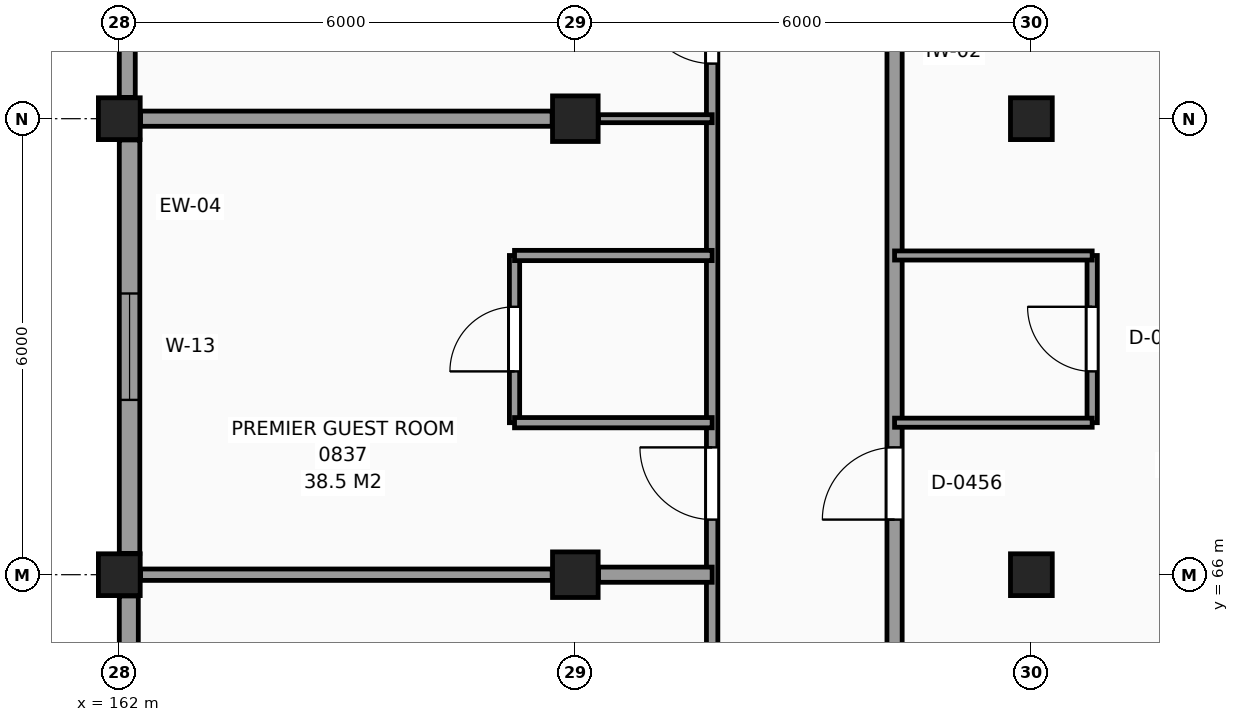
"""IFC4 building model, lengths in metres.
Left out: names, types, materials, properties, quantities, classifications, styles, units other than length and angle.
Written with IfcOpenShell. Run it as: python <this file> out.ifc"""

import sys

from ifc_helpers import new_model, si_unit, direction, frame, frame_2d, origin, origin_2d, place, context, subcontext, project, spatial, rectangle, extrude, element, fill, save


model = new_model("IFC4")
c1 = context("Model", 3, precision=1e-05, world=origin(), true_north=direction((0.0, 1.0)))
c2 = subcontext(c1, "Body", "Model", "MODEL_VIEW")
j1 = project(units=[si_unit("LENGTHUNIT", "METRE"), si_unit("PLANEANGLEUNIT", "RADIAN")], contexts=[c1])
p1 = place(None, origin())
s1 = spatial("IfcSite", under=j1, at=p1, CompositionType="ELEMENT")
p2 = place(p1, origin())
s2 = spatial("IfcBuilding", under=s1, at=p2, CompositionType="ELEMENT")
p3 = place(p2, frame((0.0, 0.0, 34.8)))
s3 = spatial("IfcBuildingStorey", under=s2, at=p3, CompositionType="ELEMENT", Elevation=34.8)
for number, where, z_axis, x_axis in (
    (1, (162.0, 66.0, 0.0), (0.0, 0.0, 1.0), (1.0, 0.0, 0.0)),
    (2, (162.0, 72.0, 0.0), (0.0, 0.0, 1.0), (1.0, 0.0, 0.0)),
):
    element("IfcColumn", number, at=place(p3, frame(where, z_axis=z_axis, x_axis=x_axis)), inside=s3, PredefinedType="COLUMN", context=c2, shape_type="SweptSolid", body=[
        extrude(rectangle(XDim=0.55, YDim=0.55, at=origin_2d()), origin(), (0.0, 0.0, 1.0), 3.3),
    ])
for number, where, z_axis, x_axis in (
    (3, (168.0, 66.0, 0.0), (0.0, 0.0, 1.0), (1.0, 0.0, 0.0)),
    (4, (168.0, 72.0, 0.0), (0.0, 0.0, 1.0), (1.0, 0.0, 0.0)),
):
    element("IfcColumn", number, at=place(p3, frame(where, z_axis=z_axis, x_axis=x_axis)), inside=s3, PredefinedType="COLUMN", context=c2, shape_type="SweptSolid", body=[
        extrude(rectangle(XDim=0.6, YDim=0.6, at=origin_2d()), origin(), (0.0, 0.0, 1.0), 3.3),
    ])
for number, where, z_axis, x_axis in (
    (5, (174.0, 66.0, 0.0), (0.0, 0.0, 1.0), (1.0, 0.0, 0.0)),
    (6, (174.0, 72.0, 0.0), (0.0, 0.0, 1.0), (1.0, 0.0, 0.0)),
):
    element("IfcColumn", number, at=place(p3, frame(where, z_axis=z_axis, x_axis=x_axis)), inside=s3, PredefinedType="COLUMN", context=c2, shape_type="SweptSolid", body=[
        extrude(rectangle(XDim=0.55, YDim=0.55, at=origin_2d()), origin(), (0.0, 0.0, 1.0), 3.3),
    ])
p4 = place(p3, frame((162.105, 77.72, 0.0), z_axis=(0.0, 0.0, 1.0), x_axis=(0.0, -1.0, 0.0)))
e7 = element("IfcWall", 7, at=p4, inside=s3, PredefinedType="SOLIDWALL", context=c2, shape_type="SweptSolid", body=[
    extrude(rectangle(XDim=5.44, YDim=0.21, at=frame_2d((2.72, 0.0))), origin(), (0.0, 0.0, 1.0), 2.42),
])
p5 = place(p4, frame((2.02, 0.0, 0.8)))
e8 = element("IfcOpeningElement", 8, at=p5, cuts=e7, PredefinedType="OPENING", context=c2, shape_type="SweptSolid", body=[
    extrude(rectangle(XDim=1.4, YDim=1.4, at=frame_2d((0.7, 0.7))), frame((0.0, 0.115, 0.0), z_axis=(0.0, -1.0, 0.0), x_axis=(1.0, 0.0, 0.0)), (0.0, 0.0, 1.0), 0.23),
])
p6 = place(p3, frame((162.135, 71.72, 0.0), z_axis=(0.0, 0.0, 1.0), x_axis=(0.0, -1.0, 0.0)))
e9 = element("IfcWall", 9, at=p6, inside=s3, PredefinedType="SOLIDWALL", context=c2, shape_type="SweptSolid", body=[
    extrude(rectangle(XDim=5.44, YDim=0.27, at=frame_2d((2.72, 0.0))), origin(), (0.0, 0.0, 1.0), 2.42),
])
p7 = place(p6, frame((2.02, 0.0, 0.8)))
e10 = element("IfcOpeningElement", 10, at=p7, cuts=e9, PredefinedType="OPENING", context=c2, shape_type="SweptSolid", body=[
    extrude(rectangle(XDim=1.4, YDim=1.4, at=frame_2d((0.7, 0.7))), frame((0.0, 0.145, 0.0), z_axis=(0.0, -1.0, 0.0), x_axis=(1.0, 0.0, 0.0)), (0.0, 0.0, 1.0), 0.29),
])
p8 = place(p3, frame((162.125, 65.72, 0.0), z_axis=(0.0, 0.0, 1.0), x_axis=(0.0, -1.0, 0.0)))
e11 = element("IfcWall", 11, at=p8, inside=s3, PredefinedType="SOLIDWALL", context=c2, shape_type="SweptSolid", body=[
    extrude(rectangle(XDim=5.44, YDim=0.25, at=frame_2d((2.72, 0.0))), origin(), (0.0, 0.0, 1.0), 2.42),
])
p9 = place(p8, frame((2.02, 0.0, 0.8)))
e12 = element("IfcOpeningElement", 12, at=p9, cuts=e11, PredefinedType="OPENING", context=c2, shape_type="SweptSolid", body=[
    extrude(rectangle(XDim=1.4, YDim=1.4, at=frame_2d((0.7, 0.7))), frame((0.0, 0.135, 0.0), z_axis=(0.0, -1.0, 0.0), x_axis=(1.0, 0.0, 0.0)), (0.0, 0.0, 1.0), 0.27),
])
p10 = place(p3, frame((167.2, 68.0, 0.0), z_axis=(0.0, 0.0, 1.0), x_axis=(0.0, 1.0, 0.0)))
e13 = element("IfcWall", 13, at=p10, inside=s3, PredefinedType="PARTITIONING", context=c2, shape_type="SweptSolid", body=[
    extrude(rectangle(XDim=2.2, YDim=0.135, at=frame_2d((1.1, 0.0))), origin(), (0.0, 0.0, 1.0), 3.07),
])
p11 = place(p10, frame((0.675, 0.0, 0.0)))
e14 = element("IfcOpeningElement", 14, at=p11, cuts=e13, PredefinedType="OPENING", context=c2, shape_type="SweptSolid", body=[
    extrude(rectangle(XDim=0.85, YDim=2.1, at=frame_2d((0.425, 1.05))), frame((0.0, 0.078, 0.0), z_axis=(0.0, -1.0, 0.0), x_axis=(1.0, 0.0, 0.0)), (0.0, 0.0, 1.0), 0.155),
])
p12 = place(p3, frame((169.8, 42.235, 0.0), z_axis=(0.0, 0.0, 1.0), x_axis=(0.0, 1.0, 0.0)))
e15 = element("IfcWall", 15, at=p12, inside=s3, PredefinedType="PARTITIONING", context=c2, shape_type="SweptSolid", body=[
    extrude(rectangle(XDim=65.585, YDim=0.15, at=frame_2d((32.792, 0.0))), origin(), (0.0, 0.0, 1.0), 3.07),
])
p13 = place(p12, frame((50.165, 0.0, 0.0)))
e16 = element("IfcOpeningElement", 16, at=p13, cuts=e15, PredefinedType="OPENING", context=c2, shape_type="SweptSolid", body=[
    extrude(rectangle(XDim=1.2, YDim=2.2, at=frame_2d((0.6, 1.1))), frame((0.0, 0.085, 0.0), z_axis=(0.0, -1.0, 0.0), x_axis=(1.0, 0.0, 0.0)), (0.0, 0.0, 1.0), 0.17),
])
p14 = place(p12, frame((0.44, 0.0, 0.0)))
e17 = element("IfcOpeningElement", 17, at=p14, cuts=e15, PredefinedType="OPENING", context=c2, shape_type="SweptSolid", body=[
    extrude(rectangle(XDim=0.95, YDim=2.1, at=frame_2d((0.475, 1.05))), frame((0.0, 0.085, 0.0), z_axis=(0.0, -1.0, 0.0), x_axis=(1.0, 0.0, 0.0)), (0.0, 0.0, 1.0), 0.17),
])
p15 = place(p12, frame((6.49, 0.0, 0.0)))
e18 = element("IfcOpeningElement", 18, at=p15, cuts=e15, PredefinedType="OPENING", context=c2, shape_type="SweptSolid", body=[
    extrude(rectangle(XDim=0.95, YDim=2.1, at=frame_2d((0.475, 1.05))), frame((0.0, 0.085, 0.0), z_axis=(0.0, -1.0, 0.0), x_axis=(1.0, 0.0, 0.0)), (0.0, 0.0, 1.0), 0.17),
])
p16 = place(p12, frame((12.49, 0.0, 0.0)))
e19 = element("IfcOpeningElement", 19, at=p16, cuts=e15, PredefinedType="OPENING", context=c2, shape_type="SweptSolid", body=[
    extrude(rectangle(XDim=0.95, YDim=2.1, at=frame_2d((0.475, 1.05))), frame((0.0, 0.085, 0.0), z_axis=(0.0, -1.0, 0.0), x_axis=(1.0, 0.0, 0.0)), (0.0, 0.0, 1.0), 0.17),
])
p17 = place(p12, frame((18.49, 0.0, 0.0)))
e20 = element("IfcOpeningElement", 20, at=p17, cuts=e15, PredefinedType="OPENING", context=c2, shape_type="SweptSolid", body=[
    extrude(rectangle(XDim=0.95, YDim=2.1, at=frame_2d((0.475, 1.05))), frame((0.0, 0.085, 0.0), z_axis=(0.0, -1.0, 0.0), x_axis=(1.0, 0.0, 0.0)), (0.0, 0.0, 1.0), 0.17),
])
p18 = place(p12, frame((24.49, 0.0, 0.0)))
e21 = element("IfcOpeningElement", 21, at=p18, cuts=e15, PredefinedType="OPENING", context=c2, shape_type="SweptSolid", body=[
    extrude(rectangle(XDim=0.95, YDim=2.1, at=frame_2d((0.475, 1.05))), frame((0.0, 0.085, 0.0), z_axis=(0.0, -1.0, 0.0), x_axis=(1.0, 0.0, 0.0)), (0.0, 0.0, 1.0), 0.17),
])
p19 = place(p12, frame((30.49, 0.0, 0.0)))
e22 = element("IfcOpeningElement", 22, at=p19, cuts=e15, PredefinedType="OPENING", context=c2, shape_type="SweptSolid", body=[
    extrude(rectangle(XDim=0.95, YDim=2.1, at=frame_2d((0.475, 1.05))), frame((0.0, 0.085, 0.0), z_axis=(0.0, -1.0, 0.0), x_axis=(1.0, 0.0, 0.0)), (0.0, 0.0, 1.0), 0.17),
])
p20 = place(p12, frame((54.49, 0.0, 0.0)))
e23 = element("IfcOpeningElement", 23, at=p20, cuts=e15, PredefinedType="OPENING", context=c2, shape_type="SweptSolid", body=[
    extrude(rectangle(XDim=0.95, YDim=2.1, at=frame_2d((0.475, 1.05))), frame((0.0, 0.085, 0.0), z_axis=(0.0, -1.0, 0.0), x_axis=(1.0, 0.0, 0.0)), (0.0, 0.0, 1.0), 0.17),
])
p21 = place(p12, frame((60.49, 0.0, 0.0)))
e24 = element("IfcOpeningElement", 24, at=p21, cuts=e15, PredefinedType="OPENING", context=c2, shape_type="SweptSolid", body=[
    extrude(rectangle(XDim=0.95, YDim=2.1, at=frame_2d((0.475, 1.05))), frame((0.0, 0.085, 0.0), z_axis=(0.0, -1.0, 0.0), x_axis=(1.0, 0.0, 0.0)), (0.0, 0.0, 1.0), 0.17),
])
p22 = place(p3, frame((172.2, 42.235, 0.0), z_axis=(0.0, 0.0, 1.0), x_axis=(0.0, 1.0, 0.0)))
e25 = element("IfcWall", 25, at=p22, inside=s3, PredefinedType="PARTITIONING", context=c2, shape_type="SweptSolid", body=[
    extrude(rectangle(XDim=65.585, YDim=0.2, at=frame_2d((32.792, 0.0))), origin(), (0.0, 0.0, 1.0), 3.07),
])
p23 = place(p22, frame((7.59, 0.0, 0.0)))
e26 = element("IfcOpeningElement", 26, at=p23, cuts=e25, PredefinedType="OPENING", context=c2, shape_type="SweptSolid", body=[
    extrude(rectangle(XDim=0.95, YDim=2.1, at=frame_2d((0.475, 1.05))), frame((0.0, 0.11, 0.0), z_axis=(0.0, -1.0, 0.0), x_axis=(1.0, 0.0, 0.0)), (0.0, 0.0, 1.0), 0.22),
])
p24 = place(p22, frame((12.09, 0.0, 0.0)))
e27 = element("IfcOpeningElement", 27, at=p24, cuts=e25, PredefinedType="OPENING", context=c2, shape_type="SweptSolid", body=[
    extrude(rectangle(XDim=0.95, YDim=2.1, at=frame_2d((0.475, 1.05))), frame((0.0, 0.11, 0.0), z_axis=(0.0, -1.0, 0.0), x_axis=(1.0, 0.0, 0.0)), (0.0, 0.0, 1.0), 0.22),
])
p25 = place(p22, frame((16.29, 0.0, 0.0)))
e28 = element("IfcOpeningElement", 28, at=p25, cuts=e25, PredefinedType="OPENING", context=c2, shape_type="SweptSolid", body=[
    extrude(rectangle(XDim=0.95, YDim=2.1, at=frame_2d((0.475, 1.05))), frame((0.0, 0.11, 0.0), z_axis=(0.0, -1.0, 0.0), x_axis=(1.0, 0.0, 0.0)), (0.0, 0.0, 1.0), 0.22),
])
p26 = place(p22, frame((18.49, 0.0, 0.0)))
e29 = element("IfcOpeningElement", 29, at=p26, cuts=e25, PredefinedType="OPENING", context=c2, shape_type="SweptSolid", body=[
    extrude(rectangle(XDim=0.95, YDim=2.1, at=frame_2d((0.475, 1.05))), frame((0.0, 0.11, 0.0), z_axis=(0.0, -1.0, 0.0), x_axis=(1.0, 0.0, 0.0)), (0.0, 0.0, 1.0), 0.22),
])
p27 = place(p22, frame((24.49, 0.0, 0.0)))
e30 = element("IfcOpeningElement", 30, at=p27, cuts=e25, PredefinedType="OPENING", context=c2, shape_type="SweptSolid", body=[
    extrude(rectangle(XDim=0.95, YDim=2.1, at=frame_2d((0.475, 1.05))), frame((0.0, 0.11, 0.0), z_axis=(0.0, -1.0, 0.0), x_axis=(1.0, 0.0, 0.0)), (0.0, 0.0, 1.0), 0.22),
])
p28 = place(p22, frame((34.29, 0.0, 0.0)))
e31 = element("IfcOpeningElement", 31, at=p28, cuts=e25, PredefinedType="OPENING", context=c2, shape_type="SweptSolid", body=[
    extrude(rectangle(XDim=0.95, YDim=2.1, at=frame_2d((0.475, 1.05))), frame((0.0, 0.11, 0.0), z_axis=(0.0, -1.0, 0.0), x_axis=(1.0, 0.0, 0.0)), (0.0, 0.0, 1.0), 0.22),
])
p29 = place(p22, frame((36.49, 0.0, 0.0)))
e32 = element("IfcOpeningElement", 32, at=p29, cuts=e25, PredefinedType="OPENING", context=c2, shape_type="SweptSolid", body=[
    extrude(rectangle(XDim=0.95, YDim=2.1, at=frame_2d((0.475, 1.05))), frame((0.0, 0.11, 0.0), z_axis=(0.0, -1.0, 0.0), x_axis=(1.0, 0.0, 0.0)), (0.0, 0.0, 1.0), 0.22),
])
p30 = place(p22, frame((40.89, 0.0, 0.0)))
e33 = element("IfcOpeningElement", 33, at=p30, cuts=e25, PredefinedType="OPENING", context=c2, shape_type="SweptSolid", body=[
    extrude(rectangle(XDim=0.95, YDim=2.1, at=frame_2d((0.475, 1.05))), frame((0.0, 0.11, 0.0), z_axis=(0.0, -1.0, 0.0), x_axis=(1.0, 0.0, 0.0)), (0.0, 0.0, 1.0), 0.22),
])
p31 = place(p22, frame((45.39, 0.0, 0.0)))
e34 = element("IfcOpeningElement", 34, at=p31, cuts=e25, PredefinedType="OPENING", context=c2, shape_type="SweptSolid", body=[
    extrude(rectangle(XDim=0.95, YDim=2.1, at=frame_2d((0.475, 1.05))), frame((0.0, 0.11, 0.0), z_axis=(0.0, -1.0, 0.0), x_axis=(1.0, 0.0, 0.0)), (0.0, 0.0, 1.0), 0.22),
])
p32 = place(p22, frame((54.49, 0.0, 0.0)))
e35 = element("IfcOpeningElement", 35, at=p32, cuts=e25, PredefinedType="OPENING", context=c2, shape_type="SweptSolid", body=[
    extrude(rectangle(XDim=0.95, YDim=2.1, at=frame_2d((0.475, 1.05))), frame((0.0, 0.11, 0.0), z_axis=(0.0, -1.0, 0.0), x_axis=(1.0, 0.0, 0.0)), (0.0, 0.0, 1.0), 0.22),
])
p33 = place(p22, frame((60.49, 0.0, 0.0)))
e36 = element("IfcOpeningElement", 36, at=p33, cuts=e25, PredefinedType="OPENING", context=c2, shape_type="SweptSolid", body=[
    extrude(rectangle(XDim=0.95, YDim=2.1, at=frame_2d((0.475, 1.05))), frame((0.0, 0.11, 0.0), z_axis=(0.0, -1.0, 0.0), x_axis=(1.0, 0.0, 0.0)), (0.0, 0.0, 1.0), 0.22),
])
p34 = place(p3, frame((174.8, 68.0, 0.0), z_axis=(0.0, 0.0, 1.0), x_axis=(0.0, 1.0, 0.0)))
e37 = element("IfcWall", 37, at=p34, inside=s3, PredefinedType="PARTITIONING", context=c2, shape_type="SweptSolid", body=[
    extrude(rectangle(XDim=2.2, YDim=0.135, at=frame_2d((1.1, 0.0))), origin(), (0.0, 0.0, 1.0), 3.07),
])
p35 = place(p34, frame((0.675, 0.0, 0.0)))
e38 = element("IfcOpeningElement", 38, at=p35, cuts=e37, PredefinedType="OPENING", context=c2, shape_type="SweptSolid", body=[
    extrude(rectangle(XDim=0.85, YDim=2.1, at=frame_2d((0.425, 1.05))), frame((0.0, 0.078, 0.0), z_axis=(0.0, -1.0, 0.0), x_axis=(1.0, 0.0, 0.0)), (0.0, 0.0, 1.0), 0.155),
])
p36 = place(p3, frame((162.28, 66.0, 0.0), z_axis=(0.0, 0.0, 1.0), x_axis=(1.0, 0.0, 0.0)))
e39 = element("IfcWall", 39, at=p36, inside=s3, PredefinedType="PARTITIONING", context=c2, shape_type="SweptSolid", body=[
    extrude(rectangle(XDim=5.415, YDim=0.15, at=frame_2d((2.708, 0.0))), origin(), (0.0, 0.0, 1.0), 2.27),
])
p37 = place(p3, frame((168.305, 66.0, 0.0), z_axis=(0.0, 0.0, 1.0), x_axis=(1.0, 0.0, 0.0)))
e40 = element("IfcWall", 40, at=p37, inside=s3, PredefinedType="PARTITIONING", context=c2, shape_type="SweptSolid", body=[
    extrude(rectangle(XDim=1.495, YDim=0.2, at=frame_2d((0.748, 0.0))), origin(), (0.0, 0.0, 1.0), 2.27),
])
p38 = place(p3, frame((167.2, 68.0, 0.0), z_axis=(0.0, 0.0, 1.0), x_axis=(1.0, 0.0, 0.0)))
e41 = element("IfcWall", 41, at=p38, inside=s3, PredefinedType="PARTITIONING", context=c2, shape_type="SweptSolid", body=[
    extrude(rectangle(XDim=2.6, YDim=0.135, at=frame_2d((1.3, 0.0))), origin(), (0.0, 0.0, 1.0), 3.07),
])
p39 = place(p3, frame((172.2, 68.0, 0.0), z_axis=(0.0, 0.0, 1.0), x_axis=(1.0, 0.0, 0.0)))
e42 = element("IfcWall", 42, at=p39, inside=s3, PredefinedType="PARTITIONING", context=c2, shape_type="SweptSolid", body=[
    extrude(rectangle(XDim=2.6, YDim=0.12, at=frame_2d((1.3, 0.0))), origin(), (0.0, 0.0, 1.0), 3.07),
])
p40 = place(p3, frame((167.2, 70.2, 0.0), z_axis=(0.0, 0.0, 1.0), x_axis=(1.0, 0.0, 0.0)))
e43 = element("IfcWall", 43, at=p40, inside=s3, PredefinedType="PARTITIONING", context=c2, shape_type="SweptSolid", body=[
    extrude(rectangle(XDim=2.6, YDim=0.135, at=frame_2d((1.3, 0.0))), origin(), (0.0, 0.0, 1.0), 3.07),
])
p41 = place(p3, frame((172.2, 70.2, 0.0), z_axis=(0.0, 0.0, 1.0), x_axis=(1.0, 0.0, 0.0)))
e44 = element("IfcWall", 44, at=p41, inside=s3, PredefinedType="PARTITIONING", context=c2, shape_type="SweptSolid", body=[
    extrude(rectangle(XDim=2.6, YDim=0.12, at=frame_2d((1.3, 0.0))), origin(), (0.0, 0.0, 1.0), 3.07),
])
p42 = place(p3, frame((162.28, 72.0, 0.0), z_axis=(0.0, 0.0, 1.0), x_axis=(1.0, 0.0, 0.0)))
e45 = element("IfcWall", 45, at=p42, inside=s3, PredefinedType="PARTITIONING", context=c2, shape_type="SweptSolid", body=[
    extrude(rectangle(XDim=5.415, YDim=0.2, at=frame_2d((2.708, 0.0))), origin(), (0.0, 0.0, 1.0), 2.27),
])
p43 = place(p3, frame((168.305, 72.0, 0.0), z_axis=(0.0, 0.0, 1.0), x_axis=(1.0, 0.0, 0.0)))
e46 = element("IfcWall", 46, at=p43, inside=s3, PredefinedType="PARTITIONING", context=c2, shape_type="SweptSolid", body=[
    extrude(rectangle(XDim=1.495, YDim=0.105, at=frame_2d((0.748, 0.0))), origin(), (0.0, 0.0, 1.0), 2.27),
])
p44 = place(p7, origin())
e47 = element("IfcWindow", 47, at=p44, inside=s3, PartitioningType="SINGLE_PANEL", PredefinedType="WINDOW", context=c2, shape_type="SweptSolid", body=[
    extrude(rectangle(XDim=1.4, YDim=1.4, at=frame_2d((0.7, 0.7))), frame((0.0, 0.03, 0.0), z_axis=(0.0, -1.0, 0.0), x_axis=(1.0, 0.0, 0.0)), (0.0, 0.0, 1.0), 0.06),
])
fill(e10, e47)
p45 = place(p35, origin())
e48 = element("IfcDoor", 48, at=p45, inside=s3, OperationType="SINGLE_SWING_RIGHT", PredefinedType="DOOR", context=c2, shape_type="SweptSolid", body=[
    extrude(rectangle(XDim=0.85, YDim=2.1, at=frame_2d((0.425, 1.05))), frame((0.0, 0.025, 0.0), z_axis=(0.0, -1.0, 0.0), x_axis=(1.0, 0.0, 0.0)), (0.0, 0.0, 1.0), 0.05),
])
fill(e38, e48)
p46 = place(p27, origin())
e49 = element("IfcDoor", 49, at=p46, inside=s3, OperationType="SINGLE_SWING_LEFT", PredefinedType="DOOR", context=c2, shape_type="SweptSolid", body=[
    extrude(rectangle(XDim=0.95, YDim=2.1, at=frame_2d((0.475, 1.05))), frame((0.0, 0.025, 0.0), z_axis=(0.0, -1.0, 0.0), x_axis=(1.0, 0.0, 0.0)), (0.0, 0.0, 1.0), 0.05),
])
fill(e30, e49)
p47 = place(p11, origin())
e50 = element("IfcDoor", 50, at=p47, inside=s3, OperationType="SINGLE_SWING_LEFT", PredefinedType="DOOR", context=c2, shape_type="SweptSolid", body=[
    extrude(rectangle(XDim=0.85, YDim=2.1, at=frame_2d((0.425, 1.05))), frame((0.0, 0.025, 0.0), z_axis=(0.0, -1.0, 0.0), x_axis=(1.0, 0.0, 0.0)), (0.0, 0.0, 1.0), 0.05),
])
fill(e14, e50)
p48 = place(p18, origin())
e51 = element("IfcDoor", 51, at=p48, inside=s3, OperationType="SINGLE_SWING_RIGHT", PredefinedType="DOOR", context=c2, shape_type="SweptSolid", body=[
    extrude(rectangle(XDim=0.95, YDim=2.1, at=frame_2d((0.475, 1.05))), frame((0.0, 0.025, 0.0), z_axis=(0.0, -1.0, 0.0), x_axis=(1.0, 0.0, 0.0)), (0.0, 0.0, 1.0), 0.05),
])
fill(e21, e51)
p49 = place(p19, origin())
e52 = element("IfcDoor", 52, at=p49, inside=s3, OperationType="SINGLE_SWING_RIGHT", PredefinedType="DOOR", context=c2, shape_type="SweptSolid", body=[
    extrude(rectangle(XDim=0.95, YDim=2.1, at=frame_2d((0.475, 1.05))), frame((0.0, 0.025, 0.0), z_axis=(0.0, -1.0, 0.0), x_axis=(1.0, 0.0, 0.0)), (0.0, 0.0, 1.0), 0.05),
])
fill(e22, e52)
save(model, sys.argv[1])
